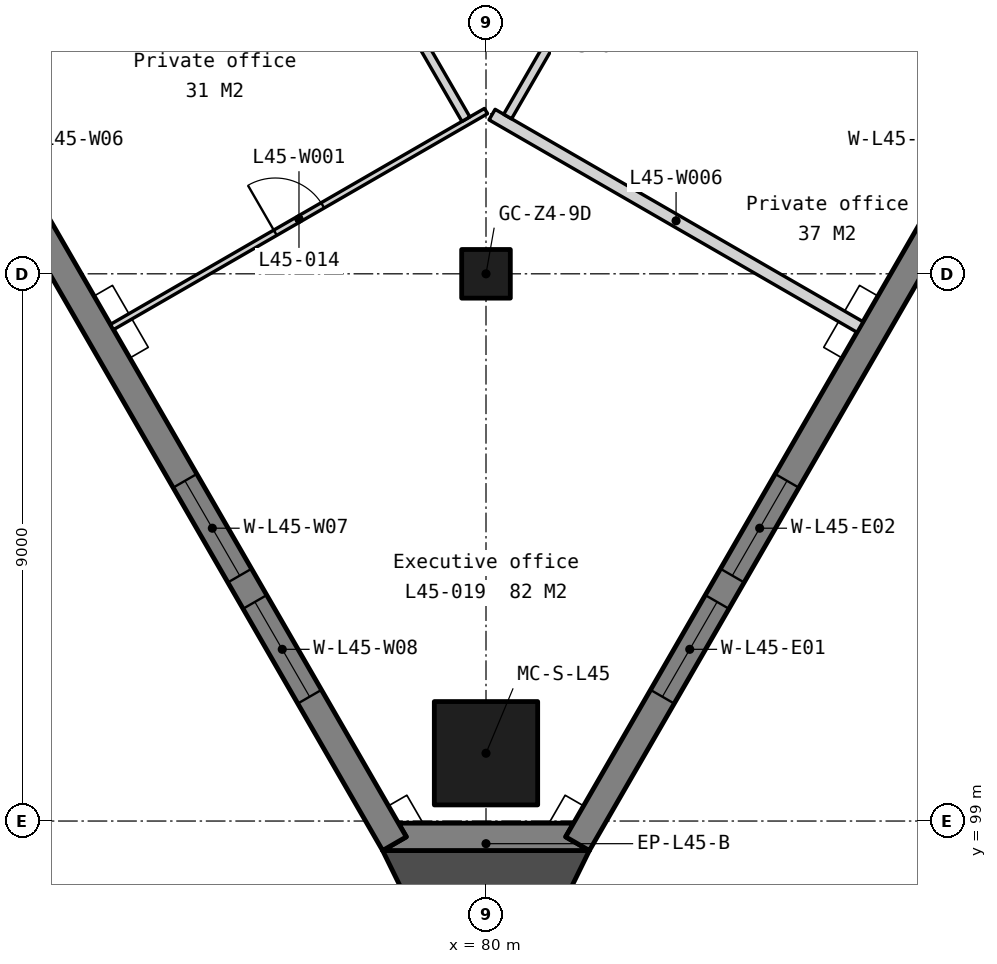
"""IFC4 building model, lengths in metres.
Left out: names, types, materials, properties, quantities, classifications, styles, units other than length and angle.
Written with IfcOpenShell. Run it as: python <this file> out.ifc"""

import sys

from ifc_helpers import new_model, si_unit, direction, frame, frame_2d, origin, origin_2d, place, context, subcontext, project, spatial, polyline, rectangle, outline, extrude, element, fill, save


model = new_model("IFC4")
c1 = context("Model", 3, precision=1e-05, world=origin(), true_north=direction((0.0, 1.0)))
c2 = subcontext(c1, "Body", "Model", "MODEL_VIEW")
j1 = project(units=[si_unit("LENGTHUNIT", "METRE"), si_unit("PLANEANGLEUNIT", "RADIAN")], contexts=[c1])
p1 = place(None, origin())
s1 = spatial("IfcSite", under=j1, at=p1, CompositionType="ELEMENT")
p2 = place(p1, origin())
s2 = spatial("IfcBuilding", under=s1, at=p2, CompositionType="ELEMENT")
p3 = place(p2, frame((0.0, 0.0, 180.2)))
s3 = spatial("IfcBuildingStorey", under=s2, at=p3, CompositionType="ELEMENT", Elevation=180.2)
p4 = place(p3, frame((80.0, 108.0, 0.0), z_axis=(0.0, 0.0, 1.0), x_axis=(1.0, 0.0, 0.0)))
e1 = element("IfcColumn", 1, at=p4, inside=s3, PredefinedType="COLUMN", context=c2, shape_type="SweptSolid", body=[
    extrude(rectangle(XDim=0.8, YDim=0.8, at=origin_2d()), origin(), (0.0, 0.0, 1.0), 3.9),
])
p5 = place(p3, frame((80.0, 100.115, 0.0), z_axis=(0.0, 0.0, 1.0), x_axis=(1.0, 0.0, 0.0)))
e2 = element("IfcColumn", 2, at=p5, inside=s3, PredefinedType="COLUMN", context=c2, shape_type="SweptSolid", body=[
    extrude(rectangle(XDim=1.7, YDim=1.7, at=origin_2d()), origin(), (0.0, 0.0, 1.0), 3.9),
])
p6 = place(p3, frame((0.0, 0.0, -0.45)))
e3 = element("IfcWall", 3, at=p6, inside=s3, PredefinedType="SOLIDWALL", context=c2, shape_type="SweptSolid", body=[
    extrude(outline(polyline([(78.3, 98.515), (78.69, 98.74), (78.56, 98.965), (81.44, 98.965), (81.31, 98.74), (81.7, 98.515), (78.3, 98.515)])), origin(), (0.0, 0.0, 1.0), 4.2),
])
p7 = place(p3, frame((59.13, 132.168, -0.45), z_axis=(0.0, 0.0, 1.0), x_axis=(0.500002199942, -0.866024133644, 0.0)))
e4 = element("IfcWall", 4, at=p7, inside=s3, PredefinedType="SOLIDWALL", context=c2, shape_type="SweptSolid", body=[
    extrude(outline(polyline([(38.729, 0.0), (38.729, 4.2), (0.0, 4.2), (0.0, 0.0), (38.729, 0.0)])), frame((0.0, 0.225, 0.0), z_axis=(0.0, -1.0, 0.0), x_axis=(1.0, 0.0, 0.0)), (0.0, 0.0, 1.0), 0.45),
])
p8 = place(p7, frame((2.791, 0.0, 1.25)))
e5 = element("IfcOpeningElement", 5, at=p8, cuts=e4, PredefinedType="OPENING", context=c2, shape_type="SweptSolid", body=[
    extrude(rectangle(XDim=1.8, YDim=2.2, at=frame_2d((0.9, 1.1))), frame((0.0, 0.235, 0.0), z_axis=(0.0, -1.0, 0.0), x_axis=(1.0, 0.0, 0.0)), (0.0, 0.0, 1.0), 0.47),
])
p9 = place(p7, frame((5.091, 0.0, 1.25)))
e6 = element("IfcOpeningElement", 6, at=p9, cuts=e4, PredefinedType="OPENING", context=c2, shape_type="SweptSolid", body=[
    extrude(rectangle(XDim=1.8, YDim=2.2, at=frame_2d((0.9, 1.1))), frame((0.0, 0.235, 0.0), z_axis=(0.0, -1.0, 0.0), x_axis=(1.0, 0.0, 0.0)), (0.0, 0.0, 1.0), 0.47),
])
p10 = place(p7, frame((12.473, 0.0, 1.25)))
e7 = element("IfcOpeningElement", 7, at=p10, cuts=e4, PredefinedType="OPENING", context=c2, shape_type="SweptSolid", body=[
    extrude(rectangle(XDim=1.8, YDim=2.2, at=frame_2d((0.9, 1.1))), frame((0.0, 0.235, 0.0), z_axis=(0.0, -1.0, 0.0), x_axis=(1.0, 0.0, 0.0)), (0.0, 0.0, 1.0), 0.47),
])
p11 = place(p7, frame((14.773, 0.0, 1.25)))
e8 = element("IfcOpeningElement", 8, at=p11, cuts=e4, PredefinedType="OPENING", context=c2, shape_type="SweptSolid", body=[
    extrude(rectangle(XDim=1.8, YDim=2.2, at=frame_2d((0.9, 1.1))), frame((0.0, 0.235, 0.0), z_axis=(0.0, -1.0, 0.0), x_axis=(1.0, 0.0, 0.0)), (0.0, 0.0, 1.0), 0.47),
])
p12 = place(p7, frame((22.156, 0.0, 1.25)))
e9 = element("IfcOpeningElement", 9, at=p12, cuts=e4, PredefinedType="OPENING", context=c2, shape_type="SweptSolid", body=[
    extrude(rectangle(XDim=1.8, YDim=2.2, at=frame_2d((0.9, 1.1))), frame((0.0, 0.235, 0.0), z_axis=(0.0, -1.0, 0.0), x_axis=(1.0, 0.0, 0.0)), (0.0, 0.0, 1.0), 0.47),
])
p13 = place(p7, frame((24.456, 0.0, 1.25)))
e10 = element("IfcOpeningElement", 10, at=p13, cuts=e4, PredefinedType="OPENING", context=c2, shape_type="SweptSolid", body=[
    extrude(rectangle(XDim=1.8, YDim=2.2, at=frame_2d((0.9, 1.1))), frame((0.0, 0.235, 0.0), z_axis=(0.0, -1.0, 0.0), x_axis=(1.0, 0.0, 0.0)), (0.0, 0.0, 1.0), 0.47),
])
p14 = place(p7, frame((31.838, 0.0, 1.25)))
e11 = element("IfcOpeningElement", 11, at=p14, cuts=e4, PredefinedType="OPENING", context=c2, shape_type="SweptSolid", body=[
    extrude(rectangle(XDim=1.8, YDim=2.2, at=frame_2d((0.9, 1.1))), frame((0.0, 0.235, 0.0), z_axis=(0.0, -1.0, 0.0), x_axis=(1.0, 0.0, 0.0)), (0.0, 0.0, 1.0), 0.47),
])
p15 = place(p7, frame((34.138, 0.0, 1.25)))
e12 = element("IfcOpeningElement", 12, at=p15, cuts=e4, PredefinedType="OPENING", context=c2, shape_type="SweptSolid", body=[
    extrude(rectangle(XDim=1.8, YDim=2.2, at=frame_2d((0.9, 1.1))), frame((0.0, 0.235, 0.0), z_axis=(0.0, -1.0, 0.0), x_axis=(1.0, 0.0, 0.0)), (0.0, 0.0, 1.0), 0.47),
])
p16 = place(p3, frame((81.505, 98.627, -0.45), z_axis=(0.0, 0.0, 1.0), x_axis=(0.500002199942, 0.866024133644, 0.0)))
e13 = element("IfcWall", 13, at=p16, inside=s3, PredefinedType="SOLIDWALL", context=c2, shape_type="SweptSolid", body=[
    extrude(outline(polyline([(38.729, 0.0), (38.729, 4.2), (0.0, 4.2), (0.0, 0.0), (38.729, 0.0)])), frame((0.0, 0.225, 0.0), z_axis=(0.0, -1.0, 0.0), x_axis=(1.0, 0.0, 0.0)), (0.0, 0.0, 1.0), 0.45),
])
p17 = place(p16, frame((2.791, 0.0, 1.25)))
e14 = element("IfcOpeningElement", 14, at=p17, cuts=e13, PredefinedType="OPENING", context=c2, shape_type="SweptSolid", body=[
    extrude(rectangle(XDim=1.8, YDim=2.2, at=frame_2d((0.9, 1.1))), frame((0.0, 0.235, 0.0), z_axis=(0.0, -1.0, 0.0), x_axis=(1.0, 0.0, 0.0)), (0.0, 0.0, 1.0), 0.47),
])
p18 = place(p16, frame((5.091, 0.0, 1.25)))
e15 = element("IfcOpeningElement", 15, at=p18, cuts=e13, PredefinedType="OPENING", context=c2, shape_type="SweptSolid", body=[
    extrude(rectangle(XDim=1.8, YDim=2.2, at=frame_2d((0.9, 1.1))), frame((0.0, 0.235, 0.0), z_axis=(0.0, -1.0, 0.0), x_axis=(1.0, 0.0, 0.0)), (0.0, 0.0, 1.0), 0.47),
])
p19 = place(p16, frame((12.473, 0.0, 1.25)))
e16 = element("IfcOpeningElement", 16, at=p19, cuts=e13, PredefinedType="OPENING", context=c2, shape_type="SweptSolid", body=[
    extrude(rectangle(XDim=1.8, YDim=2.2, at=frame_2d((0.9, 1.1))), frame((0.0, 0.235, 0.0), z_axis=(0.0, -1.0, 0.0), x_axis=(1.0, 0.0, 0.0)), (0.0, 0.0, 1.0), 0.47),
])
p20 = place(p16, frame((14.773, 0.0, 1.25)))
e17 = element("IfcOpeningElement", 17, at=p20, cuts=e13, PredefinedType="OPENING", context=c2, shape_type="SweptSolid", body=[
    extrude(rectangle(XDim=1.8, YDim=2.2, at=frame_2d((0.9, 1.1))), frame((0.0, 0.235, 0.0), z_axis=(0.0, -1.0, 0.0), x_axis=(1.0, 0.0, 0.0)), (0.0, 0.0, 1.0), 0.47),
])
p21 = place(p16, frame((22.156, 0.0, 1.25)))
e18 = element("IfcOpeningElement", 18, at=p21, cuts=e13, PredefinedType="OPENING", context=c2, shape_type="SweptSolid", body=[
    extrude(rectangle(XDim=1.8, YDim=2.2, at=frame_2d((0.9, 1.1))), frame((0.0, 0.235, 0.0), z_axis=(0.0, -1.0, 0.0), x_axis=(1.0, 0.0, 0.0)), (0.0, 0.0, 1.0), 0.47),
])
p22 = place(p16, frame((24.456, 0.0, 1.25)))
e19 = element("IfcOpeningElement", 19, at=p22, cuts=e13, PredefinedType="OPENING", context=c2, shape_type="SweptSolid", body=[
    extrude(rectangle(XDim=1.8, YDim=2.2, at=frame_2d((0.9, 1.1))), frame((0.0, 0.235, 0.0), z_axis=(0.0, -1.0, 0.0), x_axis=(1.0, 0.0, 0.0)), (0.0, 0.0, 1.0), 0.47),
])
p23 = place(p16, frame((31.838, 0.0, 1.25)))
e20 = element("IfcOpeningElement", 20, at=p23, cuts=e13, PredefinedType="OPENING", context=c2, shape_type="SweptSolid", body=[
    extrude(rectangle(XDim=1.8, YDim=2.2, at=frame_2d((0.9, 1.1))), frame((0.0, 0.235, 0.0), z_axis=(0.0, -1.0, 0.0), x_axis=(1.0, 0.0, 0.0)), (0.0, 0.0, 1.0), 0.47),
])
p24 = place(p16, frame((34.138, 0.0, 1.25)))
e21 = element("IfcOpeningElement", 21, at=p24, cuts=e13, PredefinedType="OPENING", context=c2, shape_type="SweptSolid", body=[
    extrude(rectangle(XDim=1.8, YDim=2.2, at=frame_2d((0.9, 1.1))), frame((0.0, 0.235, 0.0), z_axis=(0.0, -1.0, 0.0), x_axis=(1.0, 0.0, 0.0)), (0.0, 0.0, 1.0), 0.47),
])
p25 = place(p3, frame((0.0, 0.0, -0.45)))
e22 = element("IfcWall", 22, at=p25, inside=s3, PredefinedType="SOLIDWALL", context=c2, shape_type="SweptSolid", body=[
    extrude(outline(polyline([(78.3, 98.515), (80.0, 95.057), (81.7, 98.515), (78.3, 98.515)])), origin(), (0.0, 0.0, 1.0), 4.2),
])
p26 = place(p3, frame((73.849, 107.125, 0.0), z_axis=(0.0, 0.0, 1.0), x_axis=(0.866024174161, 0.500002129764, 0.0)))
e23 = element("IfcWall", 23, at=p26, inside=s3, PredefinedType="PARTITIONING", context=c2, shape_type="SweptSolid", body=[
    extrude(rectangle(XDim=7.103, YDim=0.1, at=frame_2d((3.552, 0.0))), origin(), (0.0, 0.0, 1.0), 3.75),
])
p27 = place(p26, frame((3.102, 0.0, 0.0)))
e24 = element("IfcOpeningElement", 24, at=p27, cuts=e23, PredefinedType="OPENING", context=c2, shape_type="SweptSolid", body=[
    extrude(rectangle(XDim=0.9, YDim=2.1, at=frame_2d((0.45, 1.05))), frame((0.0, 0.06, 0.0), z_axis=(0.0, -1.0, 0.0), x_axis=(1.0, 0.0, 0.0)), (0.0, 0.0, 1.0), 0.12),
])
p28 = place(p3, frame((77.274, 114.693, 0.0), z_axis=(0.0, 0.0, 1.0), x_axis=(0.499997407846, -0.86602690036, 0.0)))
e25 = element("IfcWall", 25, at=p28, inside=s3, PredefinedType="PARTITIONING", context=c2, shape_type="SweptSolid", body=[
    extrude(rectangle(XDim=4.791, YDim=0.15, at=frame_2d((2.396, 0.0))), origin(), (0.0, 0.0, 1.0), 3.75),
])
p29 = place(p28, frame((1.896, 0.0, 0.0)))
e26 = element("IfcOpeningElement", 26, at=p29, cuts=e25, PredefinedType="OPENING", context=c2, shape_type="SweptSolid", body=[
    extrude(rectangle(XDim=1.0, YDim=2.1, at=frame_2d((0.5, 1.05))), frame((0.0, 0.085, 0.0), z_axis=(0.0, -1.0, 0.0), x_axis=(1.0, 0.0, 0.0)), (0.0, 0.0, 1.0), 0.17),
])
p30 = place(p3, frame((80.1, 110.619, 0.0), z_axis=(0.0, 0.0, 1.0), x_axis=(0.866028486751, -0.499994660107, 0.0)))
e27 = element("IfcWall", 27, at=p30, inside=s3, PredefinedType="PARTITIONING", context=c2, shape_type="SweptSolid", body=[
    extrude(rectangle(XDim=6.987, YDim=0.2, at=frame_2d((3.494, 0.0))), origin(), (0.0, 0.0, 1.0), 3.75),
])
p31 = place(p3, frame((71.428, 111.318, 0.0), z_axis=(0.0, 0.0, 1.0), x_axis=(0.866020884234, 0.500007828009, 0.0)))
e28 = element("IfcWall", 28, at=p31, inside=s3, PredefinedType="PARTITIONING", context=c2, shape_type="SweptSolid", body=[
    extrude(rectangle(XDim=6.665, YDim=0.2, at=frame_2d((3.333, 0.0))), origin(), (0.0, 0.0, 1.0), 3.75),
])
p32 = place(p3, frame((80.356, 110.587, 0.0), z_axis=(0.0, 0.0, 1.0), x_axis=(0.500008086624, 0.86602073492, 0.0)))
e29 = element("IfcWall", 29, at=p32, inside=s3, PredefinedType="PARTITIONING", context=c2, shape_type="SweptSolid", body=[
    extrude(rectangle(XDim=3.773, YDim=0.15, at=frame_2d((1.887, 0.0))), origin(), (0.0, 0.0, 1.0), 3.75),
])
p33 = place(p32, frame((1.387, 0.0, 0.0)))
e30 = element("IfcOpeningElement", 30, at=p33, cuts=e29, PredefinedType="OPENING", context=c2, shape_type="SweptSolid", body=[
    extrude(rectangle(XDim=1.0, YDim=2.1, at=frame_2d((0.5, 1.05))), frame((0.0, 0.085, 0.0), z_axis=(0.0, -1.0, 0.0), x_axis=(1.0, 0.0, 0.0)), (0.0, 0.0, 1.0), 0.17),
])
p34 = place(p14, origin())
e31 = element("IfcWindow", 31, at=p34, inside=s3, PartitioningType="SINGLE_PANEL", PredefinedType="WINDOW", context=c2, shape_type="SweptSolid", body=[
    extrude(rectangle(XDim=1.8, YDim=2.2, at=frame_2d((0.9, 1.1))), frame((0.0, 0.03, 0.0), z_axis=(0.0, -1.0, 0.0), x_axis=(1.0, 0.0, 0.0)), (0.0, 0.0, 1.0), 0.06),
])
fill(e11, e31)
p35 = place(p15, origin())
e32 = element("IfcWindow", 32, at=p35, inside=s3, PartitioningType="SINGLE_PANEL", PredefinedType="WINDOW", context=c2, shape_type="SweptSolid", body=[
    extrude(rectangle(XDim=1.8, YDim=2.2, at=frame_2d((0.9, 1.1))), frame((0.0, 0.03, 0.0), z_axis=(0.0, -1.0, 0.0), x_axis=(1.0, 0.0, 0.0)), (0.0, 0.0, 1.0), 0.06),
])
fill(e12, e32)
p36 = place(p17, origin())
e33 = element("IfcWindow", 33, at=p36, inside=s3, PartitioningType="SINGLE_PANEL", PredefinedType="WINDOW", context=c2, shape_type="SweptSolid", body=[
    extrude(rectangle(XDim=1.8, YDim=2.2, at=frame_2d((0.9, 1.1))), frame((0.0, 0.03, 0.0), z_axis=(0.0, -1.0, 0.0), x_axis=(1.0, 0.0, 0.0)), (0.0, 0.0, 1.0), 0.06),
])
fill(e14, e33)
p37 = place(p18, origin())
e34 = element("IfcWindow", 34, at=p37, inside=s3, PartitioningType="SINGLE_PANEL", PredefinedType="WINDOW", context=c2, shape_type="SweptSolid", body=[
    extrude(rectangle(XDim=1.8, YDim=2.2, at=frame_2d((0.9, 1.1))), frame((0.0, 0.03, 0.0), z_axis=(0.0, -1.0, 0.0), x_axis=(1.0, 0.0, 0.0)), (0.0, 0.0, 1.0), 0.06),
])
fill(e15, e34)
p38 = place(p27, origin())
e35 = element("IfcDoor", 35, at=p38, inside=s3, OperationType="SINGLE_SWING_LEFT", PredefinedType="DOOR", context=c2, shape_type="SweptSolid", body=[
    extrude(rectangle(XDim=0.9, YDim=2.1, at=frame_2d((0.45, 1.05))), frame((0.0, 0.025, 0.0), z_axis=(0.0, -1.0, 0.0), x_axis=(1.0, 0.0, 0.0)), (0.0, 0.0, 1.0), 0.05),
])
fill(e24, e35)
save(model, sys.argv[1])
